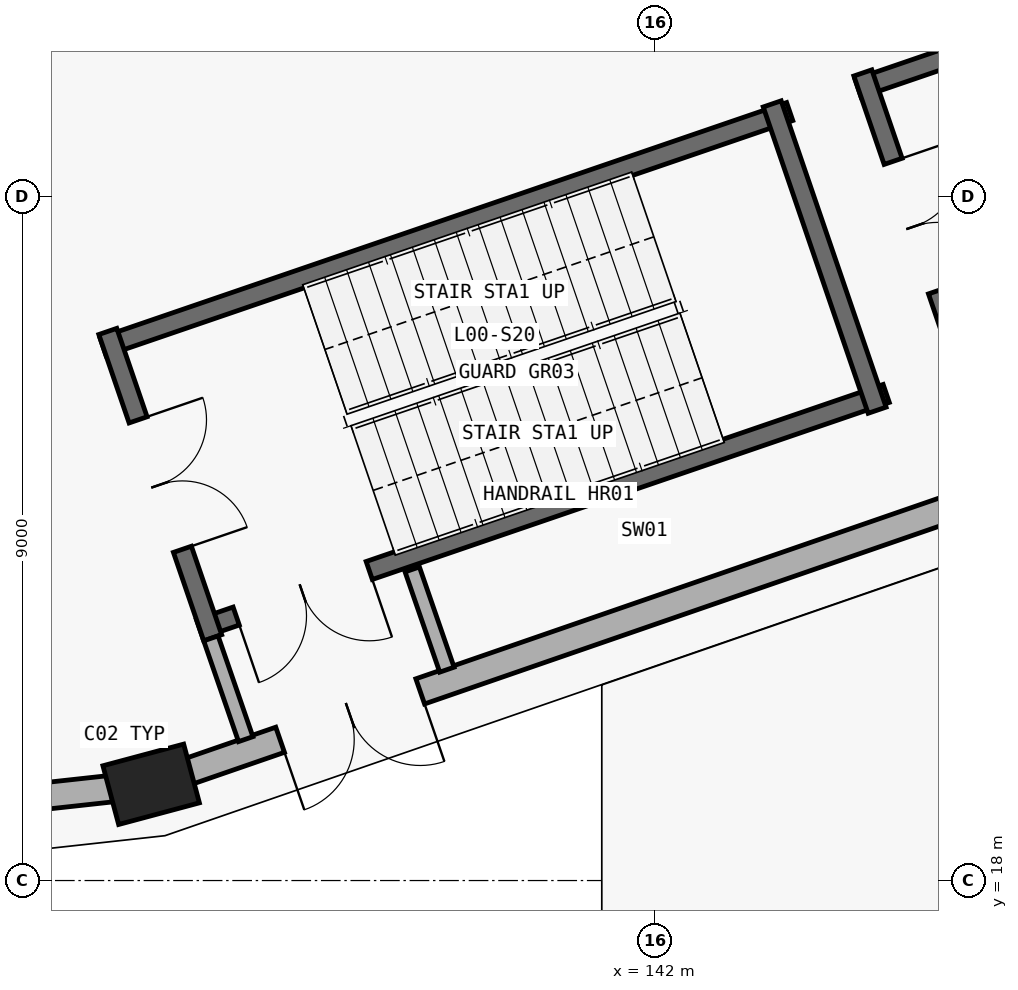
"""IFC4 building model, lengths in metres.
Left out: names, types, materials, properties, quantities, classifications, styles, units other than length and angle.
Written with IfcOpenShell. Run it as: python <this file> out.ifc"""

import sys

from ifc_helpers import new_model, si_unit, direction, frame, frame_2d, origin, origin_2d, place, context, subcontext, project, spatial, rectangle, extrude, element, fill, save


model = new_model("IFC4")
c1 = context("Model", 3, precision=1e-05, world=origin(), true_north=direction((0.0, 1.0)))
c2 = subcontext(c1, "Body", "Model", "MODEL_VIEW")
j1 = project(units=[si_unit("LENGTHUNIT", "METRE"), si_unit("PLANEANGLEUNIT", "RADIAN")], contexts=[c1])
p1 = place(None, origin())
s1 = spatial("IfcSite", under=j1, at=p1, CompositionType="ELEMENT")
p2 = place(p1, origin())
s2 = spatial("IfcBuilding", under=s1, at=p2, CompositionType="ELEMENT")
p3 = place(p2, origin())
s3 = spatial("IfcBuildingStorey", under=s2, at=p3, CompositionType="ELEMENT", Elevation=0.0)
p4 = place(p3, frame((135.371, 19.266, 0.0), z_axis=(0.0, 0.0, 1.0), x_axis=(-0.258819045103, 0.965925826289, 0.0)))
e1 = element("IfcColumn", 1, at=p4, inside=s3, PredefinedType="COLUMN", context=c2, shape_type="SweptSolid", body=[
    extrude(rectangle(XDim=0.8, YDim=1.1, at=origin_2d()), origin(), (0.0, 0.0, 1.0), 5.4),
])
p5 = place(p3, frame((134.843, 19.208, 0.0), z_axis=(0.0, 0.0, 1.0), x_axis=(-0.994028735725, -0.10911861689, 0.0)))
e2 = element("IfcWall", 2, at=p5, inside=s3, PredefinedType="STANDARD", context=c2, shape_type="SweptSolid", body=[
    extrude(rectangle(XDim=22.452, YDim=0.35, at=frame_2d((11.226, 0.0))), origin(), (0.0, 0.0, 1.0), 4.165),
])
p6 = place(p5, frame((17.906, 0.0, 0.0)))
e3 = element("IfcOpeningElement", 3, at=p6, cuts=e2, PredefinedType="OPENING", context=c2, shape_type="SweptSolid", body=[
    extrude(rectangle(XDim=1.95, YDim=2.25, at=frame_2d((0.975, 1.125))), frame((0.0, 0.185, 0.0), z_axis=(0.0, -1.0, 0.0), x_axis=(1.0, 0.0, 0.0)), (0.0, 0.0, 1.0), 0.37),
])
p7 = place(p5, frame((3.788, 0.0, 0.0)))
e4 = element("IfcOpeningElement", 4, at=p7, cuts=e2, PredefinedType="OPENING", context=c2, shape_type="SweptSolid", body=[
    extrude(rectangle(XDim=3.2, YDim=2.6, at=frame_2d((1.6, 1.3))), frame((0.0, 0.185, 0.0), z_axis=(0.0, -1.0, 0.0), x_axis=(1.0, 0.0, 0.0)), (0.0, 0.0, 1.0), 0.37),
])
p8 = place(p3, frame((156.644, 26.613, 0.0), z_axis=(0.0, 0.0, 1.0), x_axis=(-0.945215757663, -0.326446276538, 0.0)))
e5 = element("IfcWall", 5, at=p8, inside=s3, PredefinedType="STANDARD", context=c2, shape_type="SweptSolid", body=[
    extrude(rectangle(XDim=21.979, YDim=0.35, at=frame_2d((10.99, 0.0))), origin(), (0.0, 0.0, 1.0), 4.165),
])
p9 = place(p8, frame((18.761, 0.0, 0.0)))
e6 = element("IfcOpeningElement", 6, at=p9, cuts=e5, PredefinedType="OPENING", context=c2, shape_type="SweptSolid", body=[
    extrude(rectangle(XDim=1.95, YDim=2.25, at=frame_2d((0.975, 1.125))), frame((0.0, 0.185, 0.0), z_axis=(0.0, -1.0, 0.0), x_axis=(1.0, 0.0, 0.0)), (0.0, 0.0, 1.0), 0.37),
])
p10 = place(p8, frame((8.261, 0.0, 0.0)))
e7 = element("IfcOpeningElement", 7, at=p10, cuts=e5, PredefinedType="OPENING", context=c2, shape_type="SweptSolid", body=[
    extrude(rectangle(XDim=1.95, YDim=2.25, at=frame_2d((0.975, 1.125))), frame((0.0, 0.185, 0.0), z_axis=(0.0, -1.0, 0.0), x_axis=(1.0, 0.0, 0.0)), (0.0, 0.0, 1.0), 0.37),
])
p11 = place(p8, frame((4.3, 0.0, 0.0)))
e8 = element("IfcOpeningElement", 8, at=p11, cuts=e5, PredefinedType="OPENING", context=c2, shape_type="SweptSolid", body=[
    extrude(rectangle(XDim=1.95, YDim=2.25, at=frame_2d((0.975, 1.125))), frame((0.0, 0.185, 0.0), z_axis=(0.0, -1.0, 0.0), x_axis=(1.0, 0.0, 0.0)), (0.0, 0.0, 1.0), 0.37),
])
p12 = place(p3, frame((145.042, 24.408, 0.0), z_axis=(0.0, 0.0, 1.0), x_axis=(-0.946064424228, -0.323978556712, 0.0)))
e9 = element("IfcWall", 9, at=p12, inside=s3, PredefinedType="SHEAR", context=c2, shape_type="SweptSolid", body=[
    extrude(rectangle(XDim=9.55, YDim=0.25, at=frame_2d((4.775, 0.0))), origin(), (0.0, 0.0, 1.0), 5.1),
])
p13 = place(p12, frame((7.19, 0.0, 0.0)))
e10 = element("IfcOpeningElement", 10, at=p13, cuts=e9, PredefinedType="OPENING", context=c2, shape_type="SweptSolid", body=[
    extrude(rectangle(XDim=1.85, YDim=2.3, at=frame_2d((0.925, 1.15))), frame((0.0, 0.135, 0.0), z_axis=(0.0, -1.0, 0.0), x_axis=(1.0, 0.0, 0.0)), (0.0, 0.0, 1.0), 0.27),
])
p14 = place(p3, frame((143.772, 28.117, 0.0), z_axis=(0.0, 0.0, 1.0), x_axis=(-0.946067107432, -0.323970721263, 0.0)))
e11 = element("IfcWall", 11, at=p14, inside=s3, PredefinedType="SHEAR", context=c2, shape_type="SweptSolid", body=[
    extrude(rectangle(XDim=9.55, YDim=0.25, at=frame_2d((4.775, 0.0))), origin(), (0.0, 0.0, 1.0), 5.1),
])
p15 = place(p3, frame((134.801, 25.224, 0.0), z_axis=(0.0, 0.0, 1.0), x_axis=(0.323988758717, -0.946060930504, 0.0)))
e12 = element("IfcWall", 12, at=p15, inside=s3, PredefinedType="SHEAR", context=c2, shape_type="SweptSolid", body=[
    extrude(rectangle(XDim=4.26, YDim=0.25, at=frame_2d((2.13, 0.0))), origin(), (0.0, 0.0, 1.0), 5.1),
])
p16 = place(p15, frame((1.23, 0.0, 0.0)))
e13 = element("IfcOpeningElement", 13, at=p16, cuts=e12, PredefinedType="OPENING", context=c2, shape_type="SweptSolid", body=[
    extrude(rectangle(XDim=1.8, YDim=2.25, at=frame_2d((0.9, 1.125))), frame((0.0, 0.135, 0.0), z_axis=(0.0, -1.0, 0.0), x_axis=(1.0, 0.0, 0.0)), (0.0, 0.0, 1.0), 0.27),
])
p17 = place(p3, frame((144.922, 24.188, 0.0), z_axis=(0.0, 0.0, 1.0), x_axis=(-0.323971192516, 0.946066946056, 0.0)))
e14 = element("IfcWall", 14, at=p17, inside=s3, PredefinedType="SHEAR", context=c2, shape_type="SweptSolid", body=[
    extrude(rectangle(XDim=4.26, YDim=0.25, at=frame_2d((2.13, 0.0))), origin(), (0.0, 0.0, 1.0), 5.1),
])
p18 = place(p3, frame((153.706, 31.518, 0.0), z_axis=(0.0, 0.0, 1.0), x_axis=(-0.946064424228, -0.323978556712, 0.0)))
e15 = element("IfcWall", 15, at=p18, inside=s3, PredefinedType="SHEAR", context=c2, shape_type="SweptSolid", body=[
    extrude(rectangle(XDim=9.55, YDim=0.25, at=frame_2d((4.775, 0.0))), origin(), (0.0, 0.0, 1.0), 5.1),
])
p19 = place(p3, frame((144.735, 28.625, 0.0), z_axis=(0.0, 0.0, 1.0), x_axis=(0.323971192516, -0.946066946056, 0.0)))
e16 = element("IfcWall", 16, at=p19, inside=s3, PredefinedType="SHEAR", context=c2, shape_type="SweptSolid", body=[
    extrude(rectangle(XDim=4.26, YDim=0.25, at=frame_2d((2.13, 0.0))), origin(), (0.0, 0.0, 1.0), 5.1),
])
p20 = place(p19, frame((1.23, 0.0, 0.0)))
e17 = element("IfcOpeningElement", 17, at=p20, cuts=e16, PredefinedType="OPENING", context=c2, shape_type="SweptSolid", body=[
    extrude(rectangle(XDim=1.8, YDim=2.25, at=frame_2d((0.9, 1.125))), frame((0.0, 0.135, 0.0), z_axis=(0.0, -1.0, 0.0), x_axis=(1.0, 0.0, 0.0)), (0.0, 0.0, 1.0), 0.27),
])
p21 = place(p3, frame((136.157, 21.186, 0.0), z_axis=(0.0, 0.0, 1.0), x_axis=(0.326548526872, -0.945180437587, 0.0)))
e18 = element("IfcWall", 18, at=p21, inside=s3, PredefinedType="PARTITIONING", context=c2, shape_type="SweptSolid", body=[
    extrude(rectangle(XDim=1.403, YDim=0.2, at=frame_2d((0.701, 0.0))), origin(), (0.0, 0.0, 1.0), 4.165),
])
p22 = place(p3, frame((138.806, 22.093, 0.0), z_axis=(0.0, 0.0, 1.0), x_axis=(0.326599813584, -0.945162717085, 0.0)))
e19 = element("IfcWall", 19, at=p22, inside=s3, PredefinedType="PARTITIONING", context=c2, shape_type="SweptSolid", body=[
    extrude(rectangle(XDim=1.396, YDim=0.2, at=frame_2d((0.698, 0.0))), origin(), (0.0, 0.0, 1.0), 4.165),
])
p23 = place(p9, origin())
e20 = element("IfcDoor", 20, at=p23, inside=s3, OperationType="DOUBLE_DOOR_SINGLE_SWING", PredefinedType="DOOR", context=c2, shape_type="SweptSolid", body=[
    extrude(rectangle(XDim=1.95, YDim=2.25, at=frame_2d((0.975, 1.125))), frame((0.0, 0.025, 0.0), z_axis=(0.0, -1.0, 0.0), x_axis=(1.0, 0.0, 0.0)), (0.0, 0.0, 1.0), 0.05),
])
fill(e6, e20)
p24 = place(p16, origin())
e21 = element("IfcDoor", 21, at=p24, inside=s3, OperationType="DOUBLE_DOOR_SINGLE_SWING", PredefinedType="DOOR", context=c2, shape_type="SweptSolid", body=[
    extrude(rectangle(XDim=1.8, YDim=2.25, at=frame_2d((0.9, 1.125))), frame((0.0, 0.025, 0.0), z_axis=(0.0, -1.0, 0.0), x_axis=(1.0, 0.0, 0.0)), (0.0, 0.0, 1.0), 0.05),
])
fill(e13, e21)
p25 = place(p13, origin())
e22 = element("IfcDoor", 22, at=p25, inside=s3, OperationType="DOUBLE_DOOR_SINGLE_SWING", PredefinedType="DOOR", context=c2, shape_type="SweptSolid", body=[
    extrude(rectangle(XDim=1.85, YDim=2.3, at=frame_2d((0.925, 1.15))), frame((0.0, 0.025, 0.0), z_axis=(0.0, -1.0, 0.0), x_axis=(1.0, 0.0, 0.0)), (0.0, 0.0, 1.0), 0.05),
])
fill(e10, e22)
p26 = place(p20, origin())
e23 = element("IfcDoor", 23, at=p26, inside=s3, OperationType="DOUBLE_DOOR_SINGLE_SWING", PredefinedType="DOOR", context=c2, shape_type="SweptSolid", body=[
    extrude(rectangle(XDim=1.8, YDim=2.25, at=frame_2d((0.9, 1.125))), frame((0.0, 0.025, 0.0), z_axis=(0.0, -1.0, 0.0), x_axis=(1.0, 0.0, 0.0)), (0.0, 0.0, 1.0), 0.05),
])
fill(e17, e23)
save(model, sys.argv[1])
